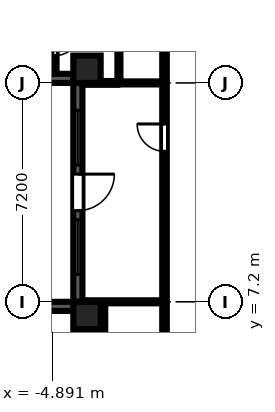
"""IFC4 building model, lengths in metres.
Left out: names, types, materials, properties, quantities, classifications, styles, units other than length and angle.
Written with IfcOpenShell. Run it as: python <this file> out.ifc"""

import sys

from ifc_helpers import new_model, si_unit, direction, frame, frame_2d, origin, origin_2d, place, context, subcontext, project, spatial, rectangle, extrude, element, fill, save


model = new_model("IFC4")
c1 = context("Model", 3, precision=1e-05, world=origin(), true_north=direction((0.0, 1.0)))
c2 = subcontext(c1, "Body", "Model", "MODEL_VIEW")
j1 = project(units=[si_unit("LENGTHUNIT", "METRE"), si_unit("PLANEANGLEUNIT", "RADIAN")], contexts=[c1])
p1 = place(None, origin())
s1 = spatial("IfcSite", under=j1, at=p1, CompositionType="ELEMENT")
p2 = place(p1, origin())
s2 = spatial("IfcBuilding", under=s1, at=p2, CompositionType="ELEMENT")
p3 = place(p2, frame((0.0, 0.0, 11.7)))
s3 = spatial("IfcBuildingStorey", under=s2, at=p3, CompositionType="ELEMENT", Elevation=11.7)
for number, where, z_axis, x_axis in (
    (1, (-3.75, 6.75, 0.0), (0.0, 0.0, 1.0), (1.0, 0.0, 0.0)),
    (2, (-3.75, 14.85, 0.0), (0.0, 0.0, 1.0), (1.0, 0.0, 0.0)),
):
    element("IfcColumn", number, at=place(p3, frame(where, z_axis=z_axis, x_axis=x_axis)), inside=s3, PredefinedType="COLUMN", context=c2, shape_type="SweptSolid", body=[
        extrude(rectangle(XDim=0.9, YDim=0.9, at=origin_2d()), origin(), (0.0, 0.0, 1.0), 3.0),
    ])
p4 = place(p3, frame((-6.3, 14.55, 0.0), z_axis=(0.0, 0.0, 1.0), x_axis=(1.0, 0.0, 0.0)))
e3 = element("IfcWall", 3, at=p4, inside=s3, PredefinedType="SOLIDWALL", context=c2, shape_type="SweptSolid", body=[
    extrude(rectangle(XDim=2.1, YDim=0.3, at=frame_2d((1.05, 0.0))), origin(), (0.0, 0.0, 1.0), 2.1),
])
p5 = place(p3, frame((-4.05, 14.4, 0.0), z_axis=(0.0, 0.0, 1.0), x_axis=(0.0, -1.0, 0.0)))
e4 = element("IfcWall", 4, at=p5, inside=s3, PredefinedType="SOLIDWALL", context=c2, shape_type="SweptSolid", body=[
    extrude(rectangle(XDim=7.2, YDim=0.3, at=frame_2d((3.6, 0.0))), origin(), (0.0, 0.0, 1.0), 2.1),
])
p6 = place(p5, frame((3.0, 0.0, 0.0)))
e5 = element("IfcOpeningElement", 5, at=p6, cuts=e4, PredefinedType="OPENING", context=c2, shape_type="SweptSolid", body=[
    extrude(rectangle(XDim=1.2, YDim=2.05, at=frame_2d((0.6, 1.025))), frame((0.0, 0.16, 0.0), z_axis=(0.0, -1.0, 0.0), x_axis=(1.0, 0.0, 0.0)), (0.0, 0.0, 1.0), 0.32),
])
p7 = place(p5, frame((0.9, 0.0, 0.2)))
e6 = element("IfcOpeningElement", 6, at=p7, cuts=e4, PredefinedType="OPENING", context=c2, shape_type="SweptSolid", body=[
    extrude(rectangle(XDim=1.8, YDim=1.85, at=frame_2d((0.9, 0.925))), frame((0.0, 0.16, 0.0), z_axis=(0.0, -1.0, 0.0), x_axis=(1.0, 0.0, 0.0)), (0.0, 0.0, 1.0), 0.32),
])
p8 = place(p5, frame((4.5, 0.0, 0.2)))
e7 = element("IfcOpeningElement", 7, at=p8, cuts=e4, PredefinedType="OPENING", context=c2, shape_type="SweptSolid", body=[
    extrude(rectangle(XDim=1.8, YDim=1.85, at=frame_2d((0.9, 0.925))), frame((0.0, 0.16, 0.0), z_axis=(0.0, -1.0, 0.0), x_axis=(1.0, 0.0, 0.0)), (0.0, 0.0, 1.0), 0.32),
])
p9 = place(p3, frame((-4.2, 7.05, 0.0), z_axis=(0.0, 0.0, 1.0), x_axis=(-1.0, 0.0, 0.0)))
e8 = element("IfcWall", 8, at=p9, inside=s3, PredefinedType="SOLIDWALL", context=c2, shape_type="SweptSolid", body=[
    extrude(rectangle(XDim=3.0, YDim=0.3, at=frame_2d((1.5, 0.0))), origin(), (0.0, 0.0, 1.0), 2.1),
])
p10 = place(p3, frame((-4.8, 14.7, 0.0), z_axis=(0.0, 0.0, 1.0), x_axis=(0.0, 1.0, 0.0)))
e9 = element("IfcWall", 9, at=p10, inside=s3, PredefinedType="PARTITIONING", context=c2, shape_type="SweptSolid", body=[
    extrude(rectangle(XDim=1.55, YDim=0.1, at=frame_2d((0.775, 0.0))), origin(), (0.0, 0.0, 1.0), 2.575),
])
p11 = place(p10, frame((0.6, 0.0, 0.0)))
e10 = element("IfcOpeningElement", 10, at=p11, cuts=e9, PredefinedType="OPENING", context=c2, shape_type="SweptSolid", body=[
    extrude(rectangle(XDim=0.8, YDim=2.1, at=frame_2d((0.4, 1.05))), frame((0.0, 0.06, 0.0), z_axis=(0.0, -1.0, 0.0), x_axis=(1.0, 0.0, 0.0)), (0.0, 0.0, 1.0), 0.12),
])
p12 = place(p3, frame((-3.9, 7.2, 0.0), z_axis=(0.0, 0.0, 1.0), x_axis=(1.0, 0.0, 0.0)))
e11 = element("IfcWall", 11, at=p12, inside=s3, PredefinedType="PARTITIONING", context=c2, shape_type="SweptSolid", body=[
    extrude(rectangle(XDim=2.625, YDim=0.1, at=frame_2d((1.312, 0.0))), origin(), (0.0, 0.0, 1.0), 2.575),
])
p13 = place(p3, frame((-3.9, 14.4, 0.0), z_axis=(0.0, 0.0, 1.0), x_axis=(1.0, 0.0, 0.0)))
e12 = element("IfcWall", 12, at=p13, inside=s3, PredefinedType="PARTITIONING", context=c2, shape_type="SweptSolid", body=[
    extrude(rectangle(XDim=1.2, YDim=0.125, at=frame_2d((0.6, 0.0))), origin(), (0.0, 0.0, 1.0), 2.575),
])
p14 = place(p3, frame((-3.2, 1.275, 0.0), z_axis=(0.0, 0.0, 1.0), x_axis=(0.0, 1.0, 0.0)))
e13 = element("IfcWall", 13, at=p14, inside=s3, PredefinedType="PARTITIONING", context=c2, shape_type="SweptSolid", body=[
    extrude(rectangle(XDim=5.875, YDim=0.1, at=frame_2d((2.938, 0.0))), origin(), (0.0, 0.0, 1.0), 2.575),
])
p15 = place(p3, frame((-2.7, 14.462, 0.0), z_axis=(0.0, 0.0, 1.0), x_axis=(0.0, 1.0, 0.0)))
e14 = element("IfcWall", 14, at=p15, inside=s3, PredefinedType="PARTITIONING", context=c2, shape_type="SweptSolid", body=[
    extrude(rectangle(XDim=17.888, YDim=0.1, at=frame_2d((8.944, 0.0))), origin(), (0.0, 0.0, 1.0), 2.575),
])
p16 = place(p15, frame((2.188, 0.0, 0.0)))
e15 = element("IfcOpeningElement", 15, at=p16, cuts=e14, PredefinedType="OPENING", context=c2, shape_type="SweptSolid", body=[
    extrude(rectangle(XDim=0.9, YDim=2.1, at=frame_2d((0.45, 1.05))), frame((0.0, 0.06, 0.0), z_axis=(0.0, -1.0, 0.0), x_axis=(1.0, 0.0, 0.0)), (0.0, 0.0, 1.0), 0.12),
])
p17 = place(p15, frame((5.788, 0.0, 0.0)))
e16 = element("IfcOpeningElement", 16, at=p17, cuts=e14, PredefinedType="OPENING", context=c2, shape_type="SweptSolid", body=[
    extrude(rectangle(XDim=0.9, YDim=2.1, at=frame_2d((0.45, 1.05))), frame((0.0, 0.06, 0.0), z_axis=(0.0, -1.0, 0.0), x_axis=(1.0, 0.0, 0.0)), (0.0, 0.0, 1.0), 0.12),
])
p18 = place(p15, frame((7.587, 0.0, 0.0)))
e17 = element("IfcOpeningElement", 17, at=p18, cuts=e14, PredefinedType="OPENING", context=c2, shape_type="SweptSolid", body=[
    extrude(rectangle(XDim=0.9, YDim=2.1, at=frame_2d((0.45, 1.05))), frame((0.0, 0.06, 0.0), z_axis=(0.0, -1.0, 0.0), x_axis=(1.0, 0.0, 0.0)), (0.0, 0.0, 1.0), 0.12),
])
p19 = place(p15, frame((12.988, 0.0, 0.0)))
e18 = element("IfcOpeningElement", 18, at=p19, cuts=e14, PredefinedType="OPENING", context=c2, shape_type="SweptSolid", body=[
    extrude(rectangle(XDim=0.9, YDim=2.1, at=frame_2d((0.45, 1.05))), frame((0.0, 0.06, 0.0), z_axis=(0.0, -1.0, 0.0), x_axis=(1.0, 0.0, 0.0)), (0.0, 0.0, 1.0), 0.12),
])
p20 = place(p15, frame((14.788, 0.0, 0.0)))
e19 = element("IfcOpeningElement", 19, at=p20, cuts=e14, PredefinedType="OPENING", context=c2, shape_type="SweptSolid", body=[
    extrude(rectangle(XDim=0.9, YDim=2.1, at=frame_2d((0.45, 1.05))), frame((0.0, 0.06, 0.0), z_axis=(0.0, -1.0, 0.0), x_axis=(1.0, 0.0, 0.0)), (0.0, 0.0, 1.0), 0.12),
])
p21 = place(p3, frame((-2.7, 14.4, 0.0), z_axis=(0.0, 0.0, 1.0), x_axis=(1.0, 0.0, 0.0)))
e20 = element("IfcWall", 20, at=p21, inside=s3, PredefinedType="PARTITIONING", context=c2, shape_type="SweptSolid", body=[
    extrude(rectangle(XDim=1.425, YDim=0.1, at=frame_2d((0.712, 0.0))), origin(), (0.0, 0.0, 1.0), 2.575),
])
p22 = place(p3, frame((-1.2, 1.125, 0.0), z_axis=(0.0, 0.0, 1.0), x_axis=(0.0, 1.0, 0.0)))
e21 = element("IfcWall", 21, at=p22, inside=s3, PredefinedType="PARTITIONING", context=c2, shape_type="SweptSolid", body=[
    extrude(rectangle(XDim=35.375, YDim=0.15, at=frame_2d((17.688, 0.0))), origin(), (0.0, 0.0, 1.0), 2.575),
])
p23 = place(p22, frame((2.625, 0.0, 0.0)))
e22 = element("IfcOpeningElement", 22, at=p23, cuts=e21, PredefinedType="OPENING", context=c2, shape_type="SweptSolid", body=[
    extrude(rectangle(XDim=0.9, YDim=2.1, at=frame_2d((0.45, 1.05))), frame((0.0, 0.085, 0.0), z_axis=(0.0, -1.0, 0.0), x_axis=(1.0, 0.0, 0.0)), (0.0, 0.0, 1.0), 0.17),
])
p24 = place(p22, frame((11.025, 0.0, 0.0)))
e23 = element("IfcOpeningElement", 23, at=p24, cuts=e21, PredefinedType="OPENING", context=c2, shape_type="SweptSolid", body=[
    extrude(rectangle(XDim=0.9, YDim=2.1, at=frame_2d((0.45, 1.05))), frame((0.0, 0.085, 0.0), z_axis=(0.0, -1.0, 0.0), x_axis=(1.0, 0.0, 0.0)), (0.0, 0.0, 1.0), 0.17),
])
p25 = place(p22, frame((32.825, 0.0, 0.0)))
e24 = element("IfcOpeningElement", 24, at=p25, cuts=e21, PredefinedType="OPENING", context=c2, shape_type="SweptSolid", body=[
    extrude(rectangle(XDim=1.0, YDim=2.1, at=frame_2d((0.5, 1.05))), frame((0.0, 0.085, 0.0), z_axis=(0.0, -1.0, 0.0), x_axis=(1.0, 0.0, 0.0)), (0.0, 0.0, 1.0), 0.17),
])
p26 = place(p6, origin())
e25 = element("IfcDoor", 25, at=p26, inside=s3, OperationType="SINGLE_SWING_LEFT", PredefinedType="DOOR", context=c2, shape_type="SweptSolid", body=[
    extrude(rectangle(XDim=1.2, YDim=2.05, at=frame_2d((0.6, 1.025))), frame((0.0, 0.025, 0.0), z_axis=(0.0, -1.0, 0.0), x_axis=(1.0, 0.0, 0.0)), (0.0, 0.0, 1.0), 0.05),
])
fill(e5, e25)
p27 = place(p7, origin())
e26 = element("IfcWindow", 26, at=p27, inside=s3, PartitioningType="SINGLE_PANEL", PredefinedType="WINDOW", context=c2, shape_type="SweptSolid", body=[
    extrude(rectangle(XDim=1.8, YDim=1.85, at=frame_2d((0.9, 0.925))), frame((0.0, 0.03, 0.0), z_axis=(0.0, -1.0, 0.0), x_axis=(1.0, 0.0, 0.0)), (0.0, 0.0, 1.0), 0.06),
])
fill(e6, e26)
p28 = place(p8, origin())
e27 = element("IfcWindow", 27, at=p28, inside=s3, PartitioningType="SINGLE_PANEL", PredefinedType="WINDOW", context=c2, shape_type="SweptSolid", body=[
    extrude(rectangle(XDim=1.8, YDim=1.85, at=frame_2d((0.9, 0.925))), frame((0.0, 0.03, 0.0), z_axis=(0.0, -1.0, 0.0), x_axis=(1.0, 0.0, 0.0)), (0.0, 0.0, 1.0), 0.06),
])
fill(e7, e27)
p29 = place(p24, origin())
e28 = element("IfcDoor", 28, at=p29, inside=s3, OperationType="SINGLE_SWING_RIGHT", PredefinedType="DOOR", context=c2, shape_type="SweptSolid", body=[
    extrude(rectangle(XDim=0.9, YDim=2.1, at=frame_2d((0.45, 1.05))), frame((0.0, 0.025, 0.0), z_axis=(0.0, -1.0, 0.0), x_axis=(1.0, 0.0, 0.0)), (0.0, 0.0, 1.0), 0.05),
])
fill(e23, e28)
p30 = place(p11, frame((0.8, 0.0, 0.0), z_axis=(0.0, 0.0, 1.0), x_axis=(-1.0, 0.0, 0.0)))
e29 = element("IfcDoor", 29, at=p30, inside=s3, OperationType="SINGLE_SWING_LEFT", PredefinedType="DOOR", context=c2, shape_type="SweptSolid", body=[
    extrude(rectangle(XDim=0.8, YDim=2.1, at=frame_2d((0.4, 1.05))), frame((0.0, 0.025, 0.0), z_axis=(0.0, -1.0, 0.0), x_axis=(1.0, 0.0, 0.0)), (0.0, 0.0, 1.0), 0.05),
])
fill(e10, e29)
save(model, sys.argv[1])
